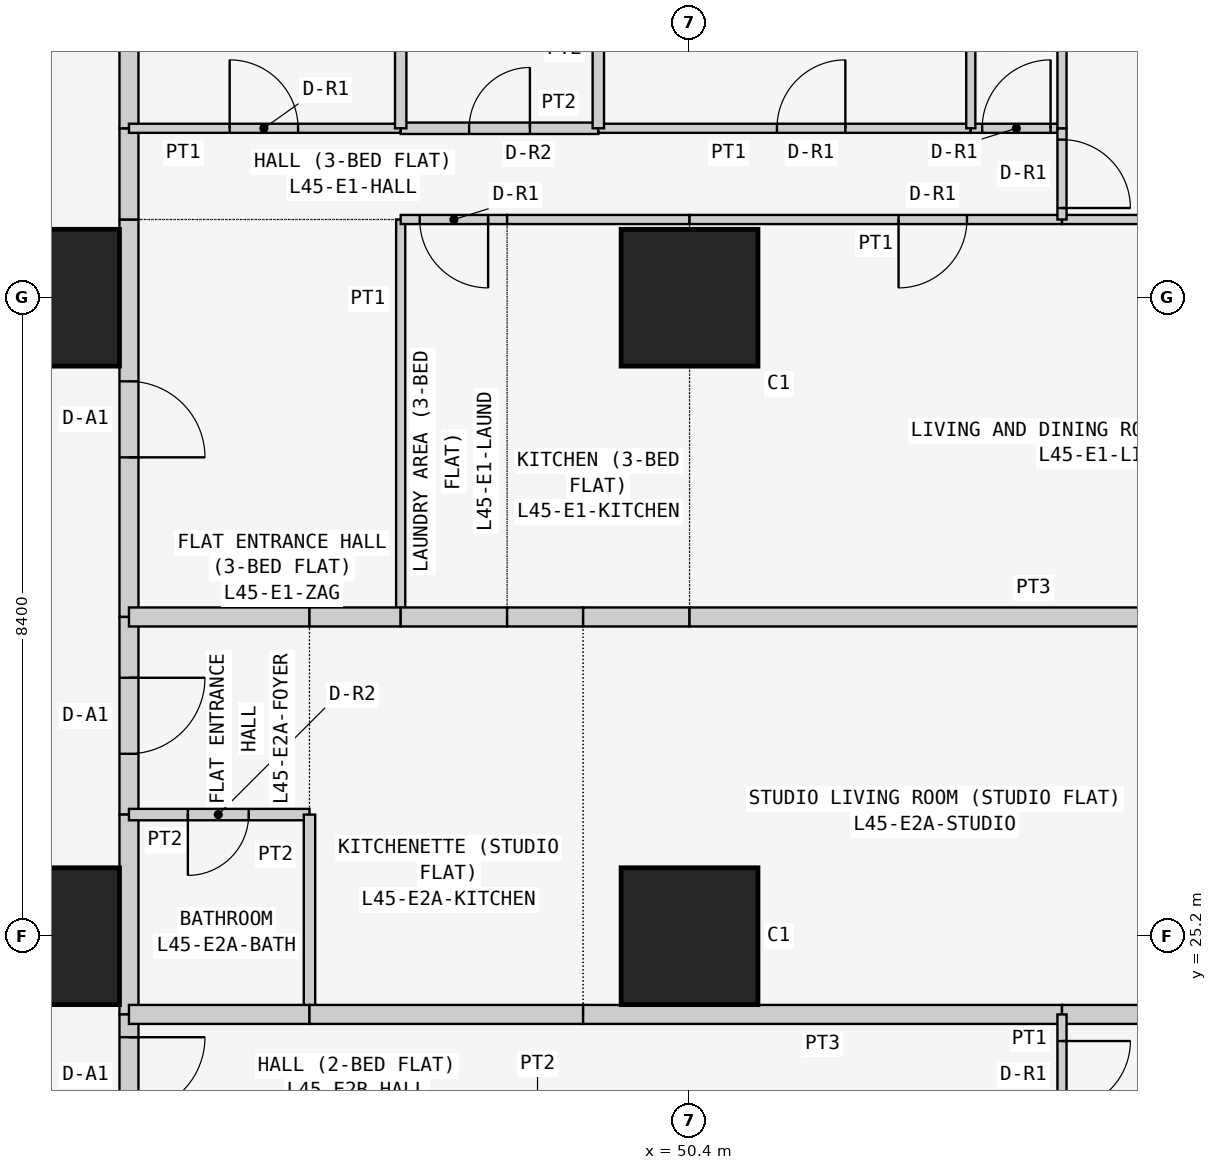
"""IFC4 building model, lengths in metres.
Left out: names, types, materials, properties, quantities, classifications, styles, units other than length and angle.
Written with IfcOpenShell. Run it as: python <this file> out.ifc"""

import sys

from ifc_helpers import new_model, si_unit, direction, frame, frame_2d, origin, origin_2d, place, context, subcontext, project, spatial, rectangle, extrude, element, fill, save


model = new_model("IFC4")
c1 = context("Model", 3, precision=1e-05, world=origin(), true_north=direction((0.0, 1.0)))
c2 = subcontext(c1, "Body", "Model", "MODEL_VIEW")
j1 = project(units=[si_unit("LENGTHUNIT", "METRE"), si_unit("PLANEANGLEUNIT", "RADIAN")], contexts=[c1])
p1 = place(None, origin())
s1 = spatial("IfcSite", under=j1, at=p1, CompositionType="ELEMENT")
p2 = place(p1, origin())
s2 = spatial("IfcBuilding", under=s1, at=p2, CompositionType="ELEMENT")
p3 = place(p2, frame((0.0, 0.0, 173.7)))
s3 = spatial("IfcBuildingStorey", under=s2, at=p3, CompositionType="ELEMENT", Elevation=173.7)
for number, where, z_axis, x_axis in (
    (1, (42.0, 25.2, 0.0), (0.0, 0.0, 1.0), (1.0, 0.0, 0.0)),
    (2, (42.0, 33.6, 0.0), (0.0, 0.0, 1.0), (1.0, 0.0, 0.0)),
    (3, (50.4, 25.2, 0.0), (0.0, 0.0, 1.0), (1.0, 0.0, 0.0)),
    (4, (50.4, 33.6, 0.0), (0.0, 0.0, 1.0), (1.0, 0.0, 0.0)),
):
    element("IfcColumn", number, at=place(p3, frame(where, z_axis=z_axis, x_axis=x_axis)), inside=s3, PredefinedType="COLUMN", context=c2, shape_type="SweptSolid", body=[
        extrude(rectangle(XDim=1.8, YDim=1.8, at=origin_2d()), origin(), (0.0, 0.0, 1.0), 3.6),
    ])
p4 = place(p3, frame((43.025, 34.629, 0.0), z_axis=(0.0, 0.0, 1.0), x_axis=(0.0, -1.0, 0.0)))
e5 = element("IfcWall", 5, at=p4, inside=s3, PredefinedType="PARTITIONING", context=c2, shape_type="SweptSolid", body=[
    extrude(rectangle(XDim=5.229, YDim=0.25, at=frame_2d((2.615, 0.0))), origin(), (0.0, 0.0, 1.0), 3.35),
])
p5 = place(p4, frame((2.129, 0.0, 0.0)))
e6 = element("IfcOpeningElement", 6, at=p5, cuts=e5, PredefinedType="OPENING", context=c2, shape_type="SweptSolid", body=[
    extrude(rectangle(XDim=1.0, YDim=2.1, at=frame_2d((0.5, 1.05))), frame((0.0, 0.135, 0.0), z_axis=(0.0, -1.0, 0.0), x_axis=(1.0, 0.0, 0.0)), (0.0, 0.0, 1.0), 0.27),
])
p6 = place(p3, frame((43.025, 35.829, 0.0), z_axis=(0.0, 0.0, 1.0), x_axis=(0.0, -1.0, 0.0)))
e7 = element("IfcWall", 7, at=p6, inside=s3, PredefinedType="PARTITIONING", context=c2, shape_type="SweptSolid", body=[
    extrude(rectangle(XDim=1.2, YDim=0.25, at=frame_2d((0.6, 0.0))), origin(), (0.0, 0.0, 1.0), 3.35),
])
p7 = place(p3, frame((43.025, 42.7, 0.0), z_axis=(0.0, 0.0, 1.0), x_axis=(0.0, -1.0, 0.0)))
e8 = element("IfcWall", 8, at=p7, inside=s3, PredefinedType="PARTITIONING", context=c2, shape_type="SweptSolid", body=[
    extrude(rectangle(XDim=6.871, YDim=0.25, at=frame_2d((3.436, 0.0))), origin(), (0.0, 0.0, 1.0), 3.35),
])
p8 = place(p3, frame((43.025, 29.4, 0.0), z_axis=(0.0, 0.0, 1.0), x_axis=(0.0, -1.0, 0.0)))
e9 = element("IfcWall", 9, at=p8, inside=s3, PredefinedType="PARTITIONING", context=c2, shape_type="SweptSolid", body=[
    extrude(rectangle(XDim=2.6, YDim=0.25, at=frame_2d((1.3, 0.0))), origin(), (0.0, 0.0, 1.0), 3.35),
])
p9 = place(p8, frame((0.8, 0.0, 0.0)))
e10 = element("IfcOpeningElement", 10, at=p9, cuts=e9, PredefinedType="OPENING", context=c2, shape_type="SweptSolid", body=[
    extrude(rectangle(XDim=1.0, YDim=2.1, at=frame_2d((0.5, 1.05))), frame((0.0, 0.135, 0.0), z_axis=(0.0, -1.0, 0.0), x_axis=(1.0, 0.0, 0.0)), (0.0, 0.0, 1.0), 0.27),
])
p10 = place(p3, frame((43.025, 26.8, 0.0), z_axis=(0.0, 0.0, 1.0), x_axis=(0.0, -1.0, 0.0)))
e11 = element("IfcWall", 11, at=p10, inside=s3, PredefinedType="PARTITIONING", context=c2, shape_type="SweptSolid", body=[
    extrude(rectangle(XDim=2.629, YDim=0.25, at=frame_2d((1.314, 0.0))), origin(), (0.0, 0.0, 1.0), 3.35),
])
p11 = place(p3, frame((43.025, 24.171, 0.0), z_axis=(0.0, 0.0, 1.0), x_axis=(0.0, -1.0, 0.0)))
e12 = element("IfcWall", 12, at=p11, inside=s3, PredefinedType="PARTITIONING", context=c2, shape_type="SweptSolid", body=[
    extrude(rectangle(XDim=1.6, YDim=0.25, at=frame_2d((0.8, 0.0))), origin(), (0.0, 0.0, 1.0), 3.35),
])
p12 = place(p11, frame((0.3, 0.0, 0.0)))
e13 = element("IfcOpeningElement", 13, at=p12, cuts=e12, PredefinedType="OPENING", context=c2, shape_type="SweptSolid", body=[
    extrude(rectangle(XDim=1.0, YDim=2.1, at=frame_2d((0.5, 1.05))), frame((0.0, 0.135, 0.0), z_axis=(0.0, -1.0, 0.0), x_axis=(1.0, 0.0, 0.0)), (0.0, 0.0, 1.0), 0.27),
])
p13 = place(p3, frame((46.6, 29.4, 0.0), z_axis=(0.0, 0.0, 1.0), x_axis=(0.0, 1.0, 0.0)))
e14 = element("IfcWall", 14, at=p13, inside=s3, PredefinedType="PARTITIONING", context=c2, shape_type="SweptSolid", body=[
    extrude(rectangle(XDim=5.229, YDim=0.12, at=frame_2d((2.615, 0.0))), origin(), (0.0, 0.0, 1.0), 3.35),
])
p14 = place(p3, frame((43.025, 29.4, 0.0), z_axis=(0.0, 0.0, 1.0), x_axis=(1.0, 0.0, 0.0)))
e15 = element("IfcWall", 15, at=p14, inside=s3, PredefinedType="PARTITIONING", context=c2, shape_type="SweptSolid", body=[
    extrude(rectangle(XDim=2.375, YDim=0.25, at=frame_2d((1.188, 0.0))), origin(), (0.0, 0.0, 1.0), 3.35),
])
p15 = place(p3, frame((45.4, 29.4, 0.0), z_axis=(0.0, 0.0, 1.0), x_axis=(1.0, 0.0, 0.0)))
e16 = element("IfcWall", 16, at=p15, inside=s3, PredefinedType="PARTITIONING", context=c2, shape_type="SweptSolid", body=[
    extrude(rectangle(XDim=1.2, YDim=0.25, at=frame_2d((0.6, 0.0))), origin(), (0.0, 0.0, 1.0), 3.35),
])
p16 = place(p3, frame((48.0, 34.629, 0.0), z_axis=(0.0, 0.0, 1.0), x_axis=(-1.0, 0.0, 0.0)))
e17 = element("IfcWall", 17, at=p16, inside=s3, PredefinedType="PARTITIONING", context=c2, shape_type="SweptSolid", body=[
    extrude(rectangle(XDim=1.4, YDim=0.12, at=frame_2d((0.7, 0.0))), origin(), (0.0, 0.0, 1.0), 3.35),
])
p17 = place(p16, frame((0.25, 0.0, 0.0)))
e18 = element("IfcOpeningElement", 18, at=p17, cuts=e17, PredefinedType="OPENING", context=c2, shape_type="SweptSolid", body=[
    extrude(rectangle(XDim=0.9, YDim=2.1, at=frame_2d((0.45, 1.05))), frame((0.0, 0.07, 0.0), z_axis=(0.0, -1.0, 0.0), x_axis=(1.0, 0.0, 0.0)), (0.0, 0.0, 1.0), 0.14),
])
p18 = place(p3, frame((46.6, 29.4, 0.0), z_axis=(0.0, 0.0, 1.0), x_axis=(1.0, 0.0, 0.0)))
e19 = element("IfcWall", 19, at=p18, inside=s3, PredefinedType="PARTITIONING", context=c2, shape_type="SweptSolid", body=[
    extrude(rectangle(XDim=1.4, YDim=0.25, at=frame_2d((0.7, 0.0))), origin(), (0.0, 0.0, 1.0), 3.35),
])
p19 = place(p3, frame((50.4, 34.629, 0.0), z_axis=(0.0, 0.0, 1.0), x_axis=(-1.0, 0.0, 0.0)))
e20 = element("IfcWall", 20, at=p19, inside=s3, PredefinedType="PARTITIONING", context=c2, shape_type="SweptSolid", body=[
    extrude(rectangle(XDim=2.4, YDim=0.12, at=frame_2d((1.2, 0.0))), origin(), (0.0, 0.0, 1.0), 3.35),
])
p20 = place(p3, frame((48.0, 29.4, 0.0), z_axis=(0.0, 0.0, 1.0), x_axis=(1.0, 0.0, 0.0)))
e21 = element("IfcWall", 21, at=p20, inside=s3, PredefinedType="PARTITIONING", context=c2, shape_type="SweptSolid", body=[
    extrude(rectangle(XDim=1.0, YDim=0.25, at=frame_2d((0.5, 0.0))), origin(), (0.0, 0.0, 1.0), 3.35),
])
p21 = place(p3, frame((49.0, 29.4, 0.0), z_axis=(0.0, 0.0, 1.0), x_axis=(1.0, 0.0, 0.0)))
e22 = element("IfcWall", 22, at=p21, inside=s3, PredefinedType="PARTITIONING", context=c2, shape_type="SweptSolid", body=[
    extrude(rectangle(XDim=1.4, YDim=0.25, at=frame_2d((0.7, 0.0))), origin(), (0.0, 0.0, 1.0), 3.35),
])
p22 = place(p3, frame((55.3, 34.629, 0.0), z_axis=(0.0, 0.0, 1.0), x_axis=(-1.0, 0.0, 0.0)))
e23 = element("IfcWall", 23, at=p22, inside=s3, PredefinedType="PARTITIONING", context=c2, shape_type="SweptSolid", body=[
    extrude(rectangle(XDim=4.9, YDim=0.12, at=frame_2d((2.45, 0.0))), origin(), (0.0, 0.0, 1.0), 3.35),
])
p23 = place(p22, frame((1.25, 0.0, 0.0)))
e24 = element("IfcOpeningElement", 24, at=p23, cuts=e23, PredefinedType="OPENING", context=c2, shape_type="SweptSolid", body=[
    extrude(rectangle(XDim=0.9, YDim=2.1, at=frame_2d((0.45, 1.05))), frame((0.0, 0.07, 0.0), z_axis=(0.0, -1.0, 0.0), x_axis=(1.0, 0.0, 0.0)), (0.0, 0.0, 1.0), 0.14),
])
p24 = place(p3, frame((59.45, 34.629, 0.0), z_axis=(0.0, 0.0, 1.0), x_axis=(-1.0, 0.0, 0.0)))
e25 = element("IfcWall", 25, at=p24, inside=s3, PredefinedType="PARTITIONING", context=c2, shape_type="SweptSolid", body=[
    extrude(rectangle(XDim=4.15, YDim=0.12, at=frame_2d((2.075, 0.0))), origin(), (0.0, 0.0, 1.0), 3.35),
])
p25 = place(p3, frame((50.4, 29.4, 0.0), z_axis=(0.0, 0.0, 1.0), x_axis=(1.0, 0.0, 0.0)))
e26 = element("IfcWall", 26, at=p25, inside=s3, PredefinedType="PARTITIONING", context=c2, shape_type="SweptSolid", body=[
    extrude(rectangle(XDim=9.05, YDim=0.25, at=frame_2d((4.525, 0.0))), origin(), (0.0, 0.0, 1.0), 3.35),
])
p26 = place(p3, frame((46.6, 35.829, 0.0), z_axis=(0.0, 0.0, 1.0), x_axis=(-1.0, 0.0, 0.0)))
e27 = element("IfcWall", 27, at=p26, inside=s3, PredefinedType="PARTITIONING", context=c2, shape_type="SweptSolid", body=[
    extrude(rectangle(XDim=3.575, YDim=0.12, at=frame_2d((1.788, 0.0))), origin(), (0.0, 0.0, 1.0), 3.35),
])
p27 = place(p26, frame((1.35, 0.0, 0.0)))
e28 = element("IfcOpeningElement", 28, at=p27, cuts=e27, PredefinedType="OPENING", context=c2, shape_type="SweptSolid", body=[
    extrude(rectangle(XDim=0.9, YDim=2.1, at=frame_2d((0.45, 1.05))), frame((0.0, 0.07, 0.0), z_axis=(0.0, -1.0, 0.0), x_axis=(1.0, 0.0, 0.0)), (0.0, 0.0, 1.0), 0.14),
])
p28 = place(p3, frame((49.2, 35.829, 0.0), z_axis=(0.0, 0.0, 1.0), x_axis=(-1.0, 0.0, 0.0)))
e29 = element("IfcWall", 29, at=p28, inside=s3, PredefinedType="PARTITIONING", context=c2, shape_type="SweptSolid", body=[
    extrude(rectangle(XDim=2.6, YDim=0.15, at=frame_2d((1.3, 0.0))), origin(), (0.0, 0.0, 1.0), 3.35),
])
p29 = place(p28, frame((0.9, 0.0, 0.0)))
e30 = element("IfcOpeningElement", 30, at=p29, cuts=e29, PredefinedType="OPENING", context=c2, shape_type="SweptSolid", body=[
    extrude(rectangle(XDim=0.8, YDim=2.1, at=frame_2d((0.4, 1.05))), frame((0.0, 0.085, 0.0), z_axis=(0.0, -1.0, 0.0), x_axis=(1.0, 0.0, 0.0)), (0.0, 0.0, 1.0), 0.17),
])
p30 = place(p3, frame((54.1, 35.829, 0.0), z_axis=(0.0, 0.0, 1.0), x_axis=(-1.0, 0.0, 0.0)))
e31 = element("IfcWall", 31, at=p30, inside=s3, PredefinedType="PARTITIONING", context=c2, shape_type="SweptSolid", body=[
    extrude(rectangle(XDim=4.9, YDim=0.12, at=frame_2d((2.45, 0.0))), origin(), (0.0, 0.0, 1.0), 3.35),
])
p31 = place(p30, frame((1.65, 0.0, 0.0)))
e32 = element("IfcOpeningElement", 32, at=p31, cuts=e31, PredefinedType="OPENING", context=c2, shape_type="SweptSolid", body=[
    extrude(rectangle(XDim=0.9, YDim=2.1, at=frame_2d((0.45, 1.05))), frame((0.0, 0.07, 0.0), z_axis=(0.0, -1.0, 0.0), x_axis=(1.0, 0.0, 0.0)), (0.0, 0.0, 1.0), 0.14),
])
p32 = place(p3, frame((55.3, 35.829, 0.0), z_axis=(0.0, 0.0, 1.0), x_axis=(-1.0, 0.0, 0.0)))
e33 = element("IfcWall", 33, at=p32, inside=s3, PredefinedType="PARTITIONING", context=c2, shape_type="SweptSolid", body=[
    extrude(rectangle(XDim=1.2, YDim=0.12, at=frame_2d((0.6, 0.0))), origin(), (0.0, 0.0, 1.0), 3.35),
])
p33 = place(p32, frame((0.15, 0.0, 0.0)))
e34 = element("IfcOpeningElement", 34, at=p33, cuts=e33, PredefinedType="OPENING", context=c2, shape_type="SweptSolid", body=[
    extrude(rectangle(XDim=0.9, YDim=2.1, at=frame_2d((0.45, 1.05))), frame((0.0, 0.07, 0.0), z_axis=(0.0, -1.0, 0.0), x_axis=(1.0, 0.0, 0.0)), (0.0, 0.0, 1.0), 0.14),
])
p34 = place(p3, frame((55.3, 34.629, 0.0), z_axis=(0.0, 0.0, 1.0), x_axis=(0.0, 1.0, 0.0)))
e35 = element("IfcWall", 35, at=p34, inside=s3, PredefinedType="PARTITIONING", context=c2, shape_type="SweptSolid", body=[
    extrude(rectangle(XDim=1.2, YDim=0.12, at=frame_2d((0.6, 0.0))), origin(), (0.0, 0.0, 1.0), 3.35),
])
p35 = place(p34, frame((0.151, 0.0, 0.0)))
e36 = element("IfcOpeningElement", 36, at=p35, cuts=e35, PredefinedType="OPENING", context=c2, shape_type="SweptSolid", body=[
    extrude(rectangle(XDim=0.9, YDim=2.1, at=frame_2d((0.45, 1.05))), frame((0.0, 0.07, 0.0), z_axis=(0.0, -1.0, 0.0), x_axis=(1.0, 0.0, 0.0)), (0.0, 0.0, 1.0), 0.14),
])
for number, where, z_axis, x_axis in (
    (37, (46.6, 35.829, 0.0), (0.0, 0.0, 1.0), (0.0, 1.0, 0.0)),
    (38, (49.2, 35.829, 0.0), (0.0, 0.0, 1.0), (0.0, 1.0, 0.0)),
):
    element("IfcWall", number, at=place(p3, frame(where, z_axis=z_axis, x_axis=x_axis)), inside=s3, PredefinedType="PARTITIONING", context=c2, shape_type="SweptSolid", body=[
        extrude(rectangle(XDim=2.971, YDim=0.15, at=frame_2d((1.485, 0.0))), origin(), (0.0, 0.0, 1.0), 3.35),
    ])
for number, where, z_axis, x_axis in (
    (39, (54.1, 35.829, 0.0), (0.0, 0.0, 1.0), (0.0, 1.0, 0.0)),
    (40, (55.3, 35.829, 0.0), (0.0, 0.0, 1.0), (0.0, 1.0, 0.0)),
):
    element("IfcWall", number, at=place(p3, frame(where, z_axis=z_axis, x_axis=x_axis)), inside=s3, PredefinedType="PARTITIONING", context=c2, shape_type="SweptSolid", body=[
        extrude(rectangle(XDim=2.285, YDim=0.12, at=frame_2d((1.143, 0.0))), origin(), (0.0, 0.0, 1.0), 3.35),
    ])
p36 = place(p3, frame((45.4, 26.8, 0.0), z_axis=(0.0, 0.0, 1.0), x_axis=(-1.0, 0.0, 0.0)))
e41 = element("IfcWall", 41, at=p36, inside=s3, PredefinedType="PARTITIONING", context=c2, shape_type="SweptSolid", body=[
    extrude(rectangle(XDim=2.375, YDim=0.15, at=frame_2d((1.188, 0.0))), origin(), (0.0, 0.0, 1.0), 3.35),
])
p37 = place(p36, frame((0.8, 0.0, 0.0)))
e42 = element("IfcOpeningElement", 42, at=p37, cuts=e41, PredefinedType="OPENING", context=c2, shape_type="SweptSolid", body=[
    extrude(rectangle(XDim=0.8, YDim=2.1, at=frame_2d((0.4, 1.05))), frame((0.0, 0.085, 0.0), z_axis=(0.0, -1.0, 0.0), x_axis=(1.0, 0.0, 0.0)), (0.0, 0.0, 1.0), 0.17),
])
p38 = place(p3, frame((45.4, 26.8, 0.0), z_axis=(0.0, 0.0, 1.0), x_axis=(0.0, -1.0, 0.0)))
e43 = element("IfcWall", 43, at=p38, inside=s3, PredefinedType="PARTITIONING", context=c2, shape_type="SweptSolid", body=[
    extrude(rectangle(XDim=2.629, YDim=0.15, at=frame_2d((1.314, 0.0))), origin(), (0.0, 0.0, 1.0), 3.35),
])
p39 = place(p3, frame((45.4, 24.171, 0.0), z_axis=(0.0, 0.0, 1.0), x_axis=(-1.0, 0.0, 0.0)))
e44 = element("IfcWall", 44, at=p39, inside=s3, PredefinedType="PARTITIONING", context=c2, shape_type="SweptSolid", body=[
    extrude(rectangle(XDim=2.375, YDim=0.25, at=frame_2d((1.188, 0.0))), origin(), (0.0, 0.0, 1.0), 3.35),
])
p40 = place(p3, frame((49.0, 24.171, 0.0), z_axis=(0.0, 0.0, 1.0), x_axis=(-1.0, 0.0, 0.0)))
e45 = element("IfcWall", 45, at=p40, inside=s3, PredefinedType="PARTITIONING", context=c2, shape_type="SweptSolid", body=[
    extrude(rectangle(XDim=3.6, YDim=0.25, at=frame_2d((1.8, 0.0))), origin(), (0.0, 0.0, 1.0), 3.35),
])
p41 = place(p3, frame((55.3, 24.171, 0.0), z_axis=(0.0, 0.0, 1.0), x_axis=(-1.0, 0.0, 0.0)))
e46 = element("IfcWall", 46, at=p41, inside=s3, PredefinedType="PARTITIONING", context=c2, shape_type="SweptSolid", body=[
    extrude(rectangle(XDim=6.3, YDim=0.25, at=frame_2d((3.15, 0.0))), origin(), (0.0, 0.0, 1.0), 3.35),
])
p42 = place(p3, frame((59.45, 24.171, 0.0), z_axis=(0.0, 0.0, 1.0), x_axis=(-1.0, 0.0, 0.0)))
e47 = element("IfcWall", 47, at=p42, inside=s3, PredefinedType="PARTITIONING", context=c2, shape_type="SweptSolid", body=[
    extrude(rectangle(XDim=4.15, YDim=0.25, at=frame_2d((2.075, 0.0))), origin(), (0.0, 0.0, 1.0), 3.35),
])
p43 = place(p3, frame((55.3, 24.171, 0.0), z_axis=(0.0, 0.0, 1.0), x_axis=(0.0, -1.0, 0.0)))
e48 = element("IfcWall", 48, at=p43, inside=s3, PredefinedType="PARTITIONING", context=c2, shape_type="SweptSolid", body=[
    extrude(rectangle(XDim=1.6, YDim=0.12, at=frame_2d((0.8, 0.0))), origin(), (0.0, 0.0, 1.0), 3.35),
])
p44 = place(p43, frame((0.35, 0.0, 0.0)))
e49 = element("IfcOpeningElement", 49, at=p44, cuts=e48, PredefinedType="OPENING", context=c2, shape_type="SweptSolid", body=[
    extrude(rectangle(XDim=0.9, YDim=2.1, at=frame_2d((0.45, 1.05))), frame((0.0, 0.07, 0.0), z_axis=(0.0, -1.0, 0.0), x_axis=(1.0, 0.0, 0.0)), (0.0, 0.0, 1.0), 0.14),
])
p45 = place(p5, origin())
e50 = element("IfcDoor", 50, at=p45, inside=s3, OperationType="SINGLE_SWING_RIGHT", PredefinedType="DOOR", context=c2, shape_type="SweptSolid", body=[
    extrude(rectangle(XDim=1.0, YDim=2.1, at=frame_2d((0.5, 1.05))), frame((0.0, 0.025, 0.0), z_axis=(0.0, -1.0, 0.0), x_axis=(1.0, 0.0, 0.0)), (0.0, 0.0, 1.0), 0.05),
])
fill(e6, e50)
p46 = place(p17, origin())
e51 = element("IfcDoor", 51, at=p46, inside=s3, OperationType="SINGLE_SWING_LEFT", PredefinedType="DOOR", context=c2, shape_type="SweptSolid", body=[
    extrude(rectangle(XDim=0.9, YDim=2.1, at=frame_2d((0.45, 1.05))), frame((0.0, 0.025, 0.0), z_axis=(0.0, -1.0, 0.0), x_axis=(1.0, 0.0, 0.0)), (0.0, 0.0, 1.0), 0.05),
])
fill(e18, e51)
p47 = place(p23, origin())
e52 = element("IfcDoor", 52, at=p47, inside=s3, OperationType="SINGLE_SWING_RIGHT", PredefinedType="DOOR", context=c2, shape_type="SweptSolid", body=[
    extrude(rectangle(XDim=0.9, YDim=2.1, at=frame_2d((0.45, 1.05))), frame((0.0, 0.025, 0.0), z_axis=(0.0, -1.0, 0.0), x_axis=(1.0, 0.0, 0.0)), (0.0, 0.0, 1.0), 0.05),
])
fill(e24, e52)
p48 = place(p27, frame((0.9, 0.0, 0.0), z_axis=(0.0, 0.0, 1.0), x_axis=(-1.0, 0.0, 0.0)))
e53 = element("IfcDoor", 53, at=p48, inside=s3, OperationType="SINGLE_SWING_LEFT", PredefinedType="DOOR", context=c2, shape_type="SweptSolid", body=[
    extrude(rectangle(XDim=0.9, YDim=2.1, at=frame_2d((0.45, 1.05))), frame((0.0, 0.025, 0.0), z_axis=(0.0, -1.0, 0.0), x_axis=(1.0, 0.0, 0.0)), (0.0, 0.0, 1.0), 0.05),
])
fill(e28, e53)
p49 = place(p29, frame((0.8, 0.0, 0.0), z_axis=(0.0, 0.0, 1.0), x_axis=(-1.0, 0.0, 0.0)))
e54 = element("IfcDoor", 54, at=p49, inside=s3, OperationType="SINGLE_SWING_RIGHT", PredefinedType="DOOR", context=c2, shape_type="SweptSolid", body=[
    extrude(rectangle(XDim=0.8, YDim=2.1, at=frame_2d((0.4, 1.05))), frame((0.0, 0.025, 0.0), z_axis=(0.0, -1.0, 0.0), x_axis=(1.0, 0.0, 0.0)), (0.0, 0.0, 1.0), 0.05),
])
fill(e30, e54)
p50 = place(p31, frame((0.9, 0.0, 0.0), z_axis=(0.0, 0.0, 1.0), x_axis=(-1.0, 0.0, 0.0)))
e55 = element("IfcDoor", 55, at=p50, inside=s3, OperationType="SINGLE_SWING_RIGHT", PredefinedType="DOOR", context=c2, shape_type="SweptSolid", body=[
    extrude(rectangle(XDim=0.9, YDim=2.1, at=frame_2d((0.45, 1.05))), frame((0.0, 0.025, 0.0), z_axis=(0.0, -1.0, 0.0), x_axis=(1.0, 0.0, 0.0)), (0.0, 0.0, 1.0), 0.05),
])
fill(e32, e55)
p51 = place(p33, frame((0.9, 0.0, 0.0), z_axis=(0.0, 0.0, 1.0), x_axis=(-1.0, 0.0, 0.0)))
e56 = element("IfcDoor", 56, at=p51, inside=s3, OperationType="SINGLE_SWING_RIGHT", PredefinedType="DOOR", context=c2, shape_type="SweptSolid", body=[
    extrude(rectangle(XDim=0.9, YDim=2.1, at=frame_2d((0.45, 1.05))), frame((0.0, 0.025, 0.0), z_axis=(0.0, -1.0, 0.0), x_axis=(1.0, 0.0, 0.0)), (0.0, 0.0, 1.0), 0.05),
])
fill(e34, e56)
p52 = place(p35, frame((0.9, 0.0, 0.0), z_axis=(0.0, 0.0, 1.0), x_axis=(-1.0, 0.0, 0.0)))
e57 = element("IfcDoor", 57, at=p52, inside=s3, OperationType="SINGLE_SWING_RIGHT", PredefinedType="DOOR", context=c2, shape_type="SweptSolid", body=[
    extrude(rectangle(XDim=0.9, YDim=2.1, at=frame_2d((0.45, 1.05))), frame((0.0, 0.025, 0.0), z_axis=(0.0, -1.0, 0.0), x_axis=(1.0, 0.0, 0.0)), (0.0, 0.0, 1.0), 0.05),
])
fill(e36, e57)
p53 = place(p9, origin())
e58 = element("IfcDoor", 58, at=p53, inside=s3, OperationType="SINGLE_SWING_LEFT", PredefinedType="DOOR", context=c2, shape_type="SweptSolid", body=[
    extrude(rectangle(XDim=1.0, YDim=2.1, at=frame_2d((0.5, 1.05))), frame((0.0, 0.025, 0.0), z_axis=(0.0, -1.0, 0.0), x_axis=(1.0, 0.0, 0.0)), (0.0, 0.0, 1.0), 0.05),
])
fill(e10, e58)
p54 = place(p37, origin())
e59 = element("IfcDoor", 59, at=p54, inside=s3, OperationType="SINGLE_SWING_RIGHT", PredefinedType="DOOR", context=c2, shape_type="SweptSolid", body=[
    extrude(rectangle(XDim=0.8, YDim=2.1, at=frame_2d((0.4, 1.05))), frame((0.0, 0.025, 0.0), z_axis=(0.0, -1.0, 0.0), x_axis=(1.0, 0.0, 0.0)), (0.0, 0.0, 1.0), 0.05),
])
fill(e42, e59)
p55 = place(p12, origin())
e60 = element("IfcDoor", 60, at=p55, inside=s3, OperationType="SINGLE_SWING_LEFT", PredefinedType="DOOR", context=c2, shape_type="SweptSolid", body=[
    extrude(rectangle(XDim=1.0, YDim=2.1, at=frame_2d((0.5, 1.05))), frame((0.0, 0.025, 0.0), z_axis=(0.0, -1.0, 0.0), x_axis=(1.0, 0.0, 0.0)), (0.0, 0.0, 1.0), 0.05),
])
fill(e13, e60)
p56 = place(p44, origin())
e61 = element("IfcDoor", 61, at=p56, inside=s3, OperationType="SINGLE_SWING_LEFT", PredefinedType="DOOR", context=c2, shape_type="SweptSolid", body=[
    extrude(rectangle(XDim=0.9, YDim=2.1, at=frame_2d((0.45, 1.05))), frame((0.0, 0.025, 0.0), z_axis=(0.0, -1.0, 0.0), x_axis=(1.0, 0.0, 0.0)), (0.0, 0.0, 1.0), 0.05),
])
fill(e49, e61)
save(model, sys.argv[1])
